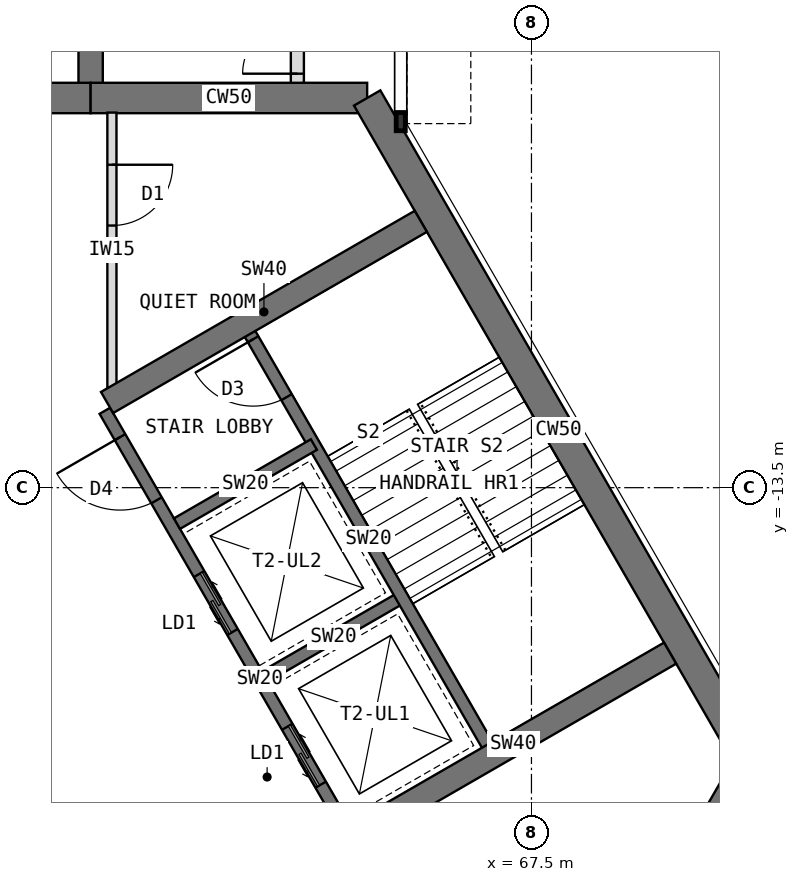
"""IFC4 building model, lengths in metres.
Left out: names, types, materials, properties, quantities, classifications, styles, units other than length and angle.
Written with IfcOpenShell. Run it as: python <this file> out.ifc"""

import sys

from ifc_helpers import new_model, si_unit, direction, frame, frame_2d, origin, place, context, subcontext, project, spatial, rectangle, extrude, element, fill, save


model = new_model("IFC4")
c1 = context("Model", 3, precision=1e-05, world=origin(), true_north=direction((0.0, 1.0)))
c2 = subcontext(c1, "Body", "Model", "MODEL_VIEW")
j1 = project(units=[si_unit("LENGTHUNIT", "METRE"), si_unit("PLANEANGLEUNIT", "RADIAN")], contexts=[c1])
p1 = place(None, origin())
s1 = spatial("IfcSite", under=j1, at=p1, CompositionType="ELEMENT")
p2 = place(p1, origin())
s2 = spatial("IfcBuilding", under=s1, at=p2, CompositionType="ELEMENT")
p3 = place(p2, frame((0.0, 0.0, 186.5)))
s3 = spatial("IfcBuildingStorey", under=s2, at=p3, CompositionType="ELEMENT", Elevation=186.5)
p4 = place(p3, frame((64.798, -7.092, 0.0), z_axis=(0.0, 0.0, 1.0), x_axis=(-1.0, 0.0, 0.0)))
e1 = element("IfcWall", 1, at=p4, inside=s3, PredefinedType="SHEAR", context=c2, shape_type="SweptSolid", body=[
    extrude(rectangle(XDim=4.548, YDim=0.5, at=frame_2d((2.274, 0.0))), origin(), (0.0, 0.0, 1.0), 4.0),
])
p5 = place(p3, frame((60.25, -7.092, 0.0), z_axis=(0.0, 0.0, 1.0), x_axis=(-1.0, 0.0, 0.0)))
e2 = element("IfcWall", 2, at=p5, inside=s3, PredefinedType="SHEAR", context=c2, shape_type="SweptSolid", body=[
    extrude(rectangle(XDim=3.5, YDim=0.5, at=frame_2d((1.75, 0.0))), origin(), (0.0, 0.0, 1.0), 4.0),
])
p6 = place(p5, frame((0.85, 0.0, 0.0)))
e3 = element("IfcOpeningElement", 3, at=p6, cuts=e2, PredefinedType="OPENING", context=c2, shape_type="SweptSolid", body=[
    extrude(rectangle(XDim=1.8, YDim=2.1, at=frame_2d((0.9, 1.05))), frame((0.0, 0.26, 0.0), z_axis=(0.0, -1.0, 0.0), x_axis=(1.0, 0.0, 0.0)), (0.0, 0.0, 1.0), 0.52),
])
p7 = place(p3, frame((68.822, -21.939, 0.0), z_axis=(0.0, 0.0, 1.0), x_axis=(0.500024481964, 0.866011268655, 0.0)))
e4 = element("IfcWall", 4, at=p7, inside=s3, PredefinedType="SHEAR", context=c2, shape_type="SweptSolid", body=[
    extrude(rectangle(XDim=4.548, YDim=0.5, at=frame_2d((2.274, 0.0))), origin(), (0.0, 0.0, 1.0), 4.0),
])
p8 = place(p3, frame((71.096, -18.0, 0.0), z_axis=(0.0, 0.0, 1.0), x_axis=(-0.500005998175, 0.866021940709, 0.0)))
e5 = element("IfcWall", 5, at=p8, inside=s3, PredefinedType="SHEAR", context=c2, shape_type="SweptSolid", body=[
    extrude(rectangle(XDim=12.596, YDim=0.5, at=frame_2d((6.298, 0.0))), origin(), (0.0, 0.0, 1.0), 4.0),
])
p9 = place(p3, frame((60.25, -7.092, 0.0), z_axis=(0.0, 0.0, 1.0), x_axis=(0.0, 1.0, 0.0)))
e6 = element("IfcWall", 6, at=p9, inside=s3, PredefinedType="SHEAR", context=c2, shape_type="SweptSolid", body=[
    extrude(rectangle(XDim=2.592, YDim=0.4, at=frame_2d((1.296, 0.0))), origin(), (0.0, 0.0, 1.0), 4.0),
])
p10 = place(p3, frame((64.484, -19.164, 0.0), z_axis=(0.0, 0.0, 1.0), x_axis=(-0.49999894854, 0.866026010844, 0.0)))
e7 = element("IfcWall", 7, at=p10, inside=s3, PredefinedType="SHEAR", context=c2, shape_type="SweptSolid", body=[
    extrude(rectangle(XDim=8.0, YDim=0.2, at=frame_2d((4.0, 0.0))), origin(), (0.0, 0.0, 1.0), 4.0),
])
p11 = place(p10, frame((6.3, 0.0, 0.0)))
e8 = element("IfcOpeningElement", 8, at=p11, cuts=e7, PredefinedType="OPENING", context=c2, shape_type="SweptSolid", body=[
    extrude(rectangle(XDim=1.2, YDim=2.1, at=frame_2d((0.6, 1.05))), frame((0.0, 0.11, 0.0), z_axis=(0.0, -1.0, 0.0), x_axis=(1.0, 0.0, 0.0)), (0.0, 0.0, 1.0), 0.22),
])
p12 = place(p10, frame((0.9, 0.0, 0.0)))
e9 = element("IfcOpeningElement", 9, at=p12, cuts=e7, PredefinedType="OPENING", context=c2, shape_type="SweptSolid", body=[
    extrude(rectangle(XDim=1.1, YDim=2.2, at=frame_2d((0.55, 1.1))), frame((0.0, 0.11, 0.0), z_axis=(0.0, -1.0, 0.0), x_axis=(1.0, 0.0, 0.0)), (0.0, 0.0, 1.0), 0.22),
])
p13 = place(p10, frame((3.8, 0.0, 0.0)))
e10 = element("IfcOpeningElement", 10, at=p13, cuts=e7, PredefinedType="OPENING", context=c2, shape_type="SweptSolid", body=[
    extrude(rectangle(XDim=1.1, YDim=2.2, at=frame_2d((0.55, 1.1))), frame((0.0, 0.11, 0.0), z_axis=(0.0, -1.0, 0.0), x_axis=(1.0, 0.0, 0.0)), (0.0, 0.0, 1.0), 0.22),
])
p14 = place(p3, frame((63.12, -16.603, 0.0), z_axis=(0.0, 0.0, 1.0), x_axis=(0.866062058628, 0.499936506574, 0.0)))
e11 = element("IfcWall", 11, at=p14, inside=s3, PredefinedType="SHEAR", context=c2, shape_type="SweptSolid", body=[
    extrude(rectangle(XDim=2.6, YDim=0.2, at=frame_2d((1.3, 0.0))), origin(), (0.0, 0.0, 1.0), 4.0),
])
p15 = place(p3, frame((61.67, -14.091, 0.0), z_axis=(0.0, 0.0, 1.0), x_axis=(0.86603858612, 0.49997716683, 0.0)))
e12 = element("IfcWall", 12, at=p15, inside=s3, PredefinedType="SHEAR", context=c2, shape_type="SweptSolid", body=[
    extrude(rectangle(XDim=2.6, YDim=0.2, at=frame_2d((1.3, 0.0))), origin(), (0.0, 0.0, 1.0), 4.0),
])
p16 = place(p3, frame((66.822, -17.814, 0.0), z_axis=(0.0, 0.0, 1.0), x_axis=(-0.49999894854, 0.866026010844, 0.0)))
e13 = element("IfcWall", 13, at=p16, inside=s3, PredefinedType="SHEAR", context=c2, shape_type="SweptSolid", body=[
    extrude(rectangle(XDim=8.0, YDim=0.2, at=frame_2d((4.0, 0.0))), origin(), (0.0, 0.0, 1.0), 4.0),
])
p17 = place(p16, frame((6.7, 0.0, 0.0)))
e14 = element("IfcOpeningElement", 14, at=p17, cuts=e13, PredefinedType="OPENING", context=c2, shape_type="SweptSolid", body=[
    extrude(rectangle(XDim=1.1, YDim=2.1, at=frame_2d((0.55, 1.05))), frame((0.0, 0.11, 0.0), z_axis=(0.0, -1.0, 0.0), x_axis=(1.0, 0.0, 0.0)), (0.0, 0.0, 1.0), 0.22),
])
p18 = place(p3, frame((60.52, -12.099, 0.0), z_axis=(0.0, 0.0, 1.0), x_axis=(0.86602319114, 0.500003832394, 0.0)))
e15 = element("IfcWall", 15, at=p18, inside=s3, PredefinedType="SHEAR", context=c2, shape_type="SweptSolid", body=[
    extrude(rectangle(XDim=5.958, YDim=0.4, at=frame_2d((2.979, 0.0))), origin(), (0.0, 0.0, 1.0), 4.0),
])
p19 = place(p3, frame((64.62, -19.201, 0.0), z_axis=(0.0, 0.0, 1.0), x_axis=(0.866012946976, 0.500021575205, 0.0)))
e16 = element("IfcWall", 16, at=p19, inside=s3, PredefinedType="SHEAR", context=c2, shape_type="SweptSolid", body=[
    extrude(rectangle(XDim=5.958, YDim=0.4, at=frame_2d((2.979, 0.0))), origin(), (0.0, 0.0, 1.0), 4.0),
])
p20 = place(p3, frame((63.65, -6.842, 0.0), z_axis=(0.0, 0.0, 1.0), x_axis=(0.0, 1.0, 0.0)))
e17 = element("IfcWall", 17, at=p20, inside=s3, PredefinedType="PARTITIONING", context=c2, shape_type="SweptSolid", body=[
    extrude(rectangle(XDim=2.4, YDim=0.215, at=frame_2d((1.2, 0.0))), origin(), (0.0, 0.0, 1.0), 3.8),
])
p21 = place(p20, frame((0.15, 0.0, 0.0)))
e18 = element("IfcOpeningElement", 18, at=p21, cuts=e17, PredefinedType="OPENING", context=c2, shape_type="SweptSolid", body=[
    extrude(rectangle(XDim=0.9, YDim=2.1, at=frame_2d((0.45, 1.05))), frame((0.0, 0.117, 0.0), z_axis=(0.0, -1.0, 0.0), x_axis=(1.0, 0.0, 0.0)), (0.0, 0.0, 1.0), 0.235),
])
p22 = place(p3, frame((60.6, -7.332, 0.0), z_axis=(0.0, 0.0, 1.0), x_axis=(0.0, -1.0, 0.0)))
e19 = element("IfcWall", 19, at=p22, inside=s3, PredefinedType="PARTITIONING", context=c2, shape_type="SweptSolid", body=[
    extrude(rectangle(XDim=4.526, YDim=0.15, at=frame_2d((2.263, 0.0))), origin(), (0.0, 0.0, 1.0), 3.8),
])
p23 = place(p22, frame((0.858, 0.0, 0.0)))
e20 = element("IfcOpeningElement", 20, at=p23, cuts=e19, PredefinedType="OPENING", context=c2, shape_type="SweptSolid", body=[
    extrude(rectangle(XDim=1.0, YDim=2.1, at=frame_2d((0.5, 1.05))), frame((0.0, 0.085, 0.0), z_axis=(0.0, -1.0, 0.0), x_axis=(1.0, 0.0, 0.0)), (0.0, 0.0, 1.0), 0.17),
])
p24 = place(p11, origin())
e21 = element("IfcDoor", 21, at=p24, inside=s3, OperationType="SINGLE_SWING_RIGHT", PredefinedType="DOOR", context=c2, shape_type="SweptSolid", body=[
    extrude(rectangle(XDim=1.2, YDim=2.1, at=frame_2d((0.6, 1.05))), frame((0.0, 0.025, 0.0), z_axis=(0.0, -1.0, 0.0), x_axis=(1.0, 0.0, 0.0)), (0.0, 0.0, 1.0), 0.05),
])
fill(e8, e21)
p25 = place(p12, origin())
e22 = element("IfcDoor", 22, at=p25, inside=s3, OperationType="DOUBLE_DOOR_SLIDING", PredefinedType="DOOR", context=c2, shape_type="SweptSolid", body=[
    extrude(rectangle(XDim=1.1, YDim=2.2, at=frame_2d((0.55, 1.1))), frame((0.0, 0.025, 0.0), z_axis=(0.0, -1.0, 0.0), x_axis=(1.0, 0.0, 0.0)), (0.0, 0.0, 1.0), 0.05),
])
fill(e9, e22)
p26 = place(p13, origin())
e23 = element("IfcDoor", 23, at=p26, inside=s3, OperationType="DOUBLE_DOOR_SLIDING", PredefinedType="DOOR", context=c2, shape_type="SweptSolid", body=[
    extrude(rectangle(XDim=1.1, YDim=2.2, at=frame_2d((0.55, 1.1))), frame((0.0, 0.025, 0.0), z_axis=(0.0, -1.0, 0.0), x_axis=(1.0, 0.0, 0.0)), (0.0, 0.0, 1.0), 0.05),
])
fill(e10, e23)
p27 = place(p17, origin())
e24 = element("IfcDoor", 24, at=p27, inside=s3, OperationType="SINGLE_SWING_RIGHT", PredefinedType="DOOR", context=c2, shape_type="SweptSolid", body=[
    extrude(rectangle(XDim=1.1, YDim=2.1, at=frame_2d((0.55, 1.05))), frame((0.0, 0.025, 0.0), z_axis=(0.0, -1.0, 0.0), x_axis=(1.0, 0.0, 0.0)), (0.0, 0.0, 1.0), 0.05),
])
fill(e14, e24)
p28 = place(p21, origin())
e25 = element("IfcDoor", 25, at=p28, inside=s3, OperationType="SINGLE_SWING_LEFT", PredefinedType="DOOR", context=c2, shape_type="SweptSolid", body=[
    extrude(rectangle(XDim=0.9, YDim=2.1, at=frame_2d((0.45, 1.05))), frame((0.0, 0.025, 0.0), z_axis=(0.0, -1.0, 0.0), x_axis=(1.0, 0.0, 0.0)), (0.0, 0.0, 1.0), 0.05),
])
fill(e18, e25)
p29 = place(p23, origin())
e26 = element("IfcDoor", 26, at=p29, inside=s3, OperationType="SINGLE_SWING_LEFT", PredefinedType="DOOR", context=c2, shape_type="SweptSolid", body=[
    extrude(rectangle(XDim=1.0, YDim=2.1, at=frame_2d((0.5, 1.05))), frame((0.0, 0.025, 0.0), z_axis=(0.0, -1.0, 0.0), x_axis=(1.0, 0.0, 0.0)), (0.0, 0.0, 1.0), 0.05),
])
fill(e20, e26)
save(model, sys.argv[1])
